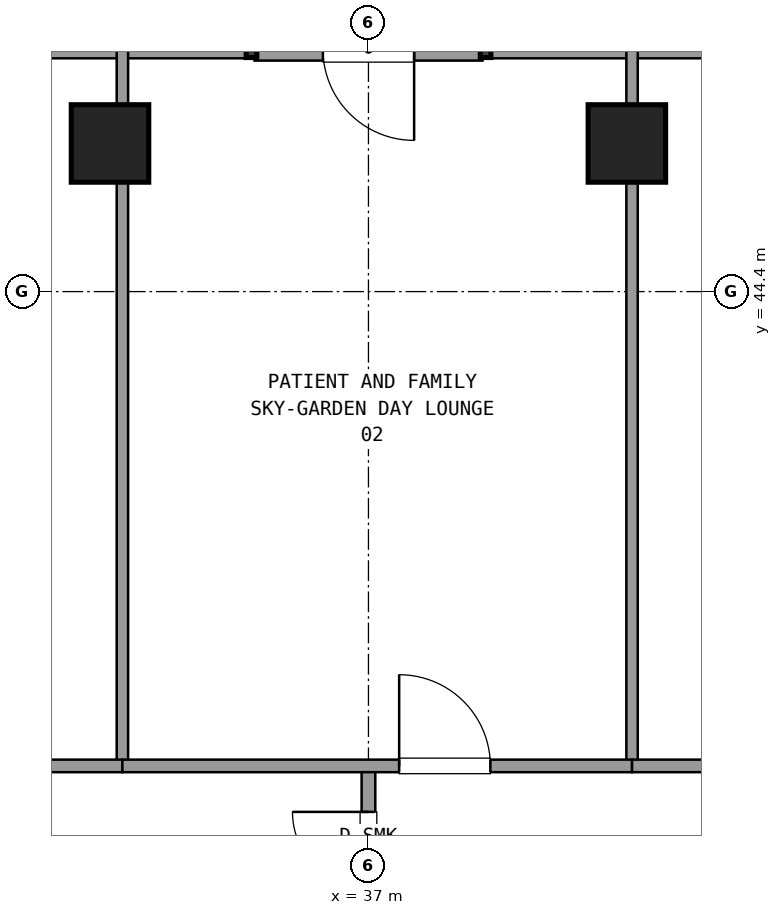
"""IFC4 building model, lengths in metres.
Left out: names, types, materials, properties, quantities, classifications, styles, units other than length and angle.
Written with IfcOpenShell. Run it as: python <this file> out.ifc"""

import sys

from ifc_helpers import new_model, si_unit, direction, frame, frame_2d, origin, origin_2d, place, context, subcontext, project, spatial, rectangle, extrude, element, fill, save


model = new_model("IFC4")
c1 = context("Model", 3, precision=1e-05, world=origin(), true_north=direction((0.0, 1.0)))
c2 = subcontext(c1, "Body", "Model", "MODEL_VIEW")
j1 = project(units=[si_unit("LENGTHUNIT", "METRE"), si_unit("PLANEANGLEUNIT", "RADIAN")], contexts=[c1])
p1 = place(None, origin())
s1 = spatial("IfcSite", under=j1, at=p1, CompositionType="ELEMENT")
p2 = place(p1, origin())
s2 = spatial("IfcBuilding", under=s1, at=p2, CompositionType="ELEMENT")
p3 = place(p2, frame((0.0, 0.0, 109.98)))
s3 = spatial("IfcBuildingStorey", under=s2, at=p3, CompositionType="ELEMENT", Elevation=109.98)
for number, where, z_axis, x_axis in (
    (1, (40.4, 46.349, 0.021), (0.0, -0.025, 1.0), (1.0, 0.0, 0.0)),
    (2, (33.6, 46.349, 0.021), (0.0, -0.025, 1.0), (1.0, 0.0, 0.0)),
):
    element("IfcColumn", number, at=place(p3, frame(where, z_axis=z_axis, x_axis=x_axis)), inside=s3, PredefinedType="COLUMN", context=c2, shape_type="SweptSolid", body=[
        extrude(rectangle(XDim=1.02, YDim=1.02, at=origin_2d()), origin(), (0.0, 0.0, 1.0), 3.559),
    ])
p4 = place(p3, frame((38.501, 47.589, 0.0), z_axis=(0.0, 0.0, 1.0), x_axis=(-1.0, 0.0, 0.0)))
e3 = element("IfcWall", 3, at=p4, inside=s3, PredefinedType="SOLIDWALL", context=c2, shape_type="SweptSolid", body=[
    extrude(rectangle(XDim=3.0, YDim=0.3, at=frame_2d((1.5, 0.0))), origin(), (0.0, 0.0, 1.0), 2.67),
])
p5 = place(p4, frame((0.9, 0.0, 0.0)))
e4 = element("IfcOpeningElement", 4, at=p5, cuts=e3, PredefinedType="OPENING", context=c2, shape_type="SweptSolid", body=[
    extrude(rectangle(XDim=1.2, YDim=2.2, at=frame_2d((0.6, 1.1))), frame((0.0, 0.16, 0.0), z_axis=(0.0, -1.0, 0.0), x_axis=(1.0, 0.0, 0.0)), (0.0, 0.0, 1.0), 0.32),
])
p6 = place(p3, frame((55.931, 47.589, 0.0), z_axis=(0.0, 0.0, 1.0), x_axis=(-1.0, 0.0, 0.0)))
e5 = element("IfcWall", 5, at=p6, inside=s3, PredefinedType="SOLIDWALL", context=c2, shape_type="SweptSolid", body=[
    extrude(rectangle(XDim=17.39, YDim=0.24, at=frame_2d((8.695, 0.0))), origin(), (0.0, 0.0, 1.0), 0.85),
])
p7 = place(p3, frame((35.461, 47.589, 0.0), z_axis=(0.0, 0.0, 1.0), x_axis=(-1.0, 0.0, 0.0)))
e6 = element("IfcWall", 6, at=p7, inside=s3, PredefinedType="SOLIDWALL", context=c2, shape_type="SweptSolid", body=[
    extrude(rectangle(XDim=17.392, YDim=0.24, at=frame_2d((8.696, 0.0))), origin(), (0.0, 0.0, 1.0), 0.85),
])
p8 = place(p3, frame((37.0, 34.95, 0.0), z_axis=(0.0, 0.0, 1.0), x_axis=(0.0, 1.0, 0.0)))
e7 = element("IfcWall", 7, at=p8, inside=s3, PredefinedType="PARTITIONING", context=c2, shape_type="SweptSolid", body=[
    extrude(rectangle(XDim=3.21, YDim=0.18, at=frame_2d((1.605, 0.0))), origin(), (0.0, 0.0, 1.0), 2.61),
])
p9 = place(p8, frame((0.605, 0.0, 0.0)))
e8 = element("IfcOpeningElement", 8, at=p9, cuts=e7, PredefinedType="OPENING", context=c2, shape_type="SweptSolid", body=[
    extrude(rectangle(XDim=2.0, YDim=2.2, at=frame_2d((1.0, 1.1))), frame((0.0, 0.1, 0.0), z_axis=(0.0, -1.0, 0.0), x_axis=(1.0, 0.0, 0.0)), (0.0, 0.0, 1.0), 0.2),
])
p10 = place(p3, frame((33.763, 38.16, 0.0), z_axis=(0.0, 0.0, 1.0), x_axis=(0.0, 1.0, 0.0)))
e9 = element("IfcWall", 9, at=p10, inside=s3, PredefinedType="PARTITIONING", context=c2, shape_type="SweptSolid", body=[
    extrude(rectangle(XDim=9.409, YDim=0.15, at=frame_2d((4.705, 0.0))), origin(), (0.0, 0.0, 1.0), 2.61),
])
p11 = place(p3, frame((25.43, 38.16, 0.0), z_axis=(0.0, 0.0, 1.0), x_axis=(1.0, 0.0, 0.0)))
e10 = element("IfcWall", 10, at=p11, inside=s3, PredefinedType="PARTITIONING", context=c2, shape_type="SweptSolid", body=[
    extrude(rectangle(XDim=8.333, YDim=0.165, at=frame_2d((4.167, 0.0))), origin(), (0.0, 0.0, 1.0), 2.61),
])
p12 = place(p11, frame((3.566, 0.0, 0.0)))
e11 = element("IfcOpeningElement", 11, at=p12, cuts=e10, PredefinedType="OPENING", context=c2, shape_type="SweptSolid", body=[
    extrude(rectangle(XDim=1.2, YDim=2.15, at=frame_2d((0.6, 1.075))), frame((0.0, 0.093, 0.0), z_axis=(0.0, -1.0, 0.0), x_axis=(1.0, 0.0, 0.0)), (0.0, 0.0, 1.0), 0.185),
])
p13 = place(p3, frame((40.468, 38.16, 0.0), z_axis=(0.0, 0.0, 1.0), x_axis=(0.0, 1.0, 0.0)))
e12 = element("IfcWall", 12, at=p13, inside=s3, PredefinedType="PARTITIONING", context=c2, shape_type="SweptSolid", body=[
    extrude(rectangle(XDim=9.409, YDim=0.15, at=frame_2d((4.705, 0.0))), origin(), (0.0, 0.0, 1.0), 2.61),
])
p14 = place(p3, frame((33.763, 38.16, 0.0), z_axis=(0.0, 0.0, 1.0), x_axis=(1.0, 0.0, 0.0)))
e13 = element("IfcWall", 13, at=p14, inside=s3, PredefinedType="PARTITIONING", context=c2, shape_type="SweptSolid", body=[
    extrude(rectangle(XDim=6.705, YDim=0.165, at=frame_2d((3.353, 0.0))), origin(), (0.0, 0.0, 1.0), 2.61),
])
p15 = place(p14, frame((3.641, 0.0, 0.0)))
e14 = element("IfcOpeningElement", 14, at=p15, cuts=e13, PredefinedType="OPENING", context=c2, shape_type="SweptSolid", body=[
    extrude(rectangle(XDim=1.2, YDim=2.15, at=frame_2d((0.6, 1.075))), frame((0.0, 0.093, 0.0), z_axis=(0.0, -1.0, 0.0), x_axis=(1.0, 0.0, 0.0)), (0.0, 0.0, 1.0), 0.185),
])
p16 = place(p3, frame((40.468, 38.16, 0.0), z_axis=(0.0, 0.0, 1.0), x_axis=(1.0, 0.0, 0.0)))
e15 = element("IfcWall", 15, at=p16, inside=s3, PredefinedType="PARTITIONING", context=c2, shape_type="SweptSolid", body=[
    extrude(rectangle(XDim=8.102, YDim=0.165, at=frame_2d((4.051, 0.0))), origin(), (0.0, 0.0, 1.0), 2.61),
])
p17 = place(p16, frame((3.451, 0.0, 0.0)))
e16 = element("IfcOpeningElement", 16, at=p17, cuts=e15, PredefinedType="OPENING", context=c2, shape_type="SweptSolid", body=[
    extrude(rectangle(XDim=1.2, YDim=2.15, at=frame_2d((0.6, 1.075))), frame((0.0, 0.093, 0.0), z_axis=(0.0, -1.0, 0.0), x_axis=(1.0, 0.0, 0.0)), (0.0, 0.0, 1.0), 0.185),
])
p18 = place(p9, origin())
e17 = element("IfcDoor", 17, at=p18, inside=s3, OperationType="DOUBLE_DOOR_SINGLE_SWING", PredefinedType="DOOR", context=c2, shape_type="SweptSolid", body=[
    extrude(rectangle(XDim=2.0, YDim=2.2, at=frame_2d((1.0, 1.1))), frame((0.0, 0.025, 0.0), z_axis=(0.0, -1.0, 0.0), x_axis=(1.0, 0.0, 0.0)), (0.0, 0.0, 1.0), 0.05),
])
fill(e8, e17)
p19 = place(p15, origin())
e18 = element("IfcDoor", 18, at=p19, inside=s3, OperationType="SINGLE_SWING_LEFT", PredefinedType="DOOR", context=c2, shape_type="SweptSolid", body=[
    extrude(rectangle(XDim=1.2, YDim=2.15, at=frame_2d((0.6, 1.075))), frame((0.0, 0.025, 0.0), z_axis=(0.0, -1.0, 0.0), x_axis=(1.0, 0.0, 0.0)), (0.0, 0.0, 1.0), 0.05),
])
fill(e14, e18)
save(model, sys.argv[1])
